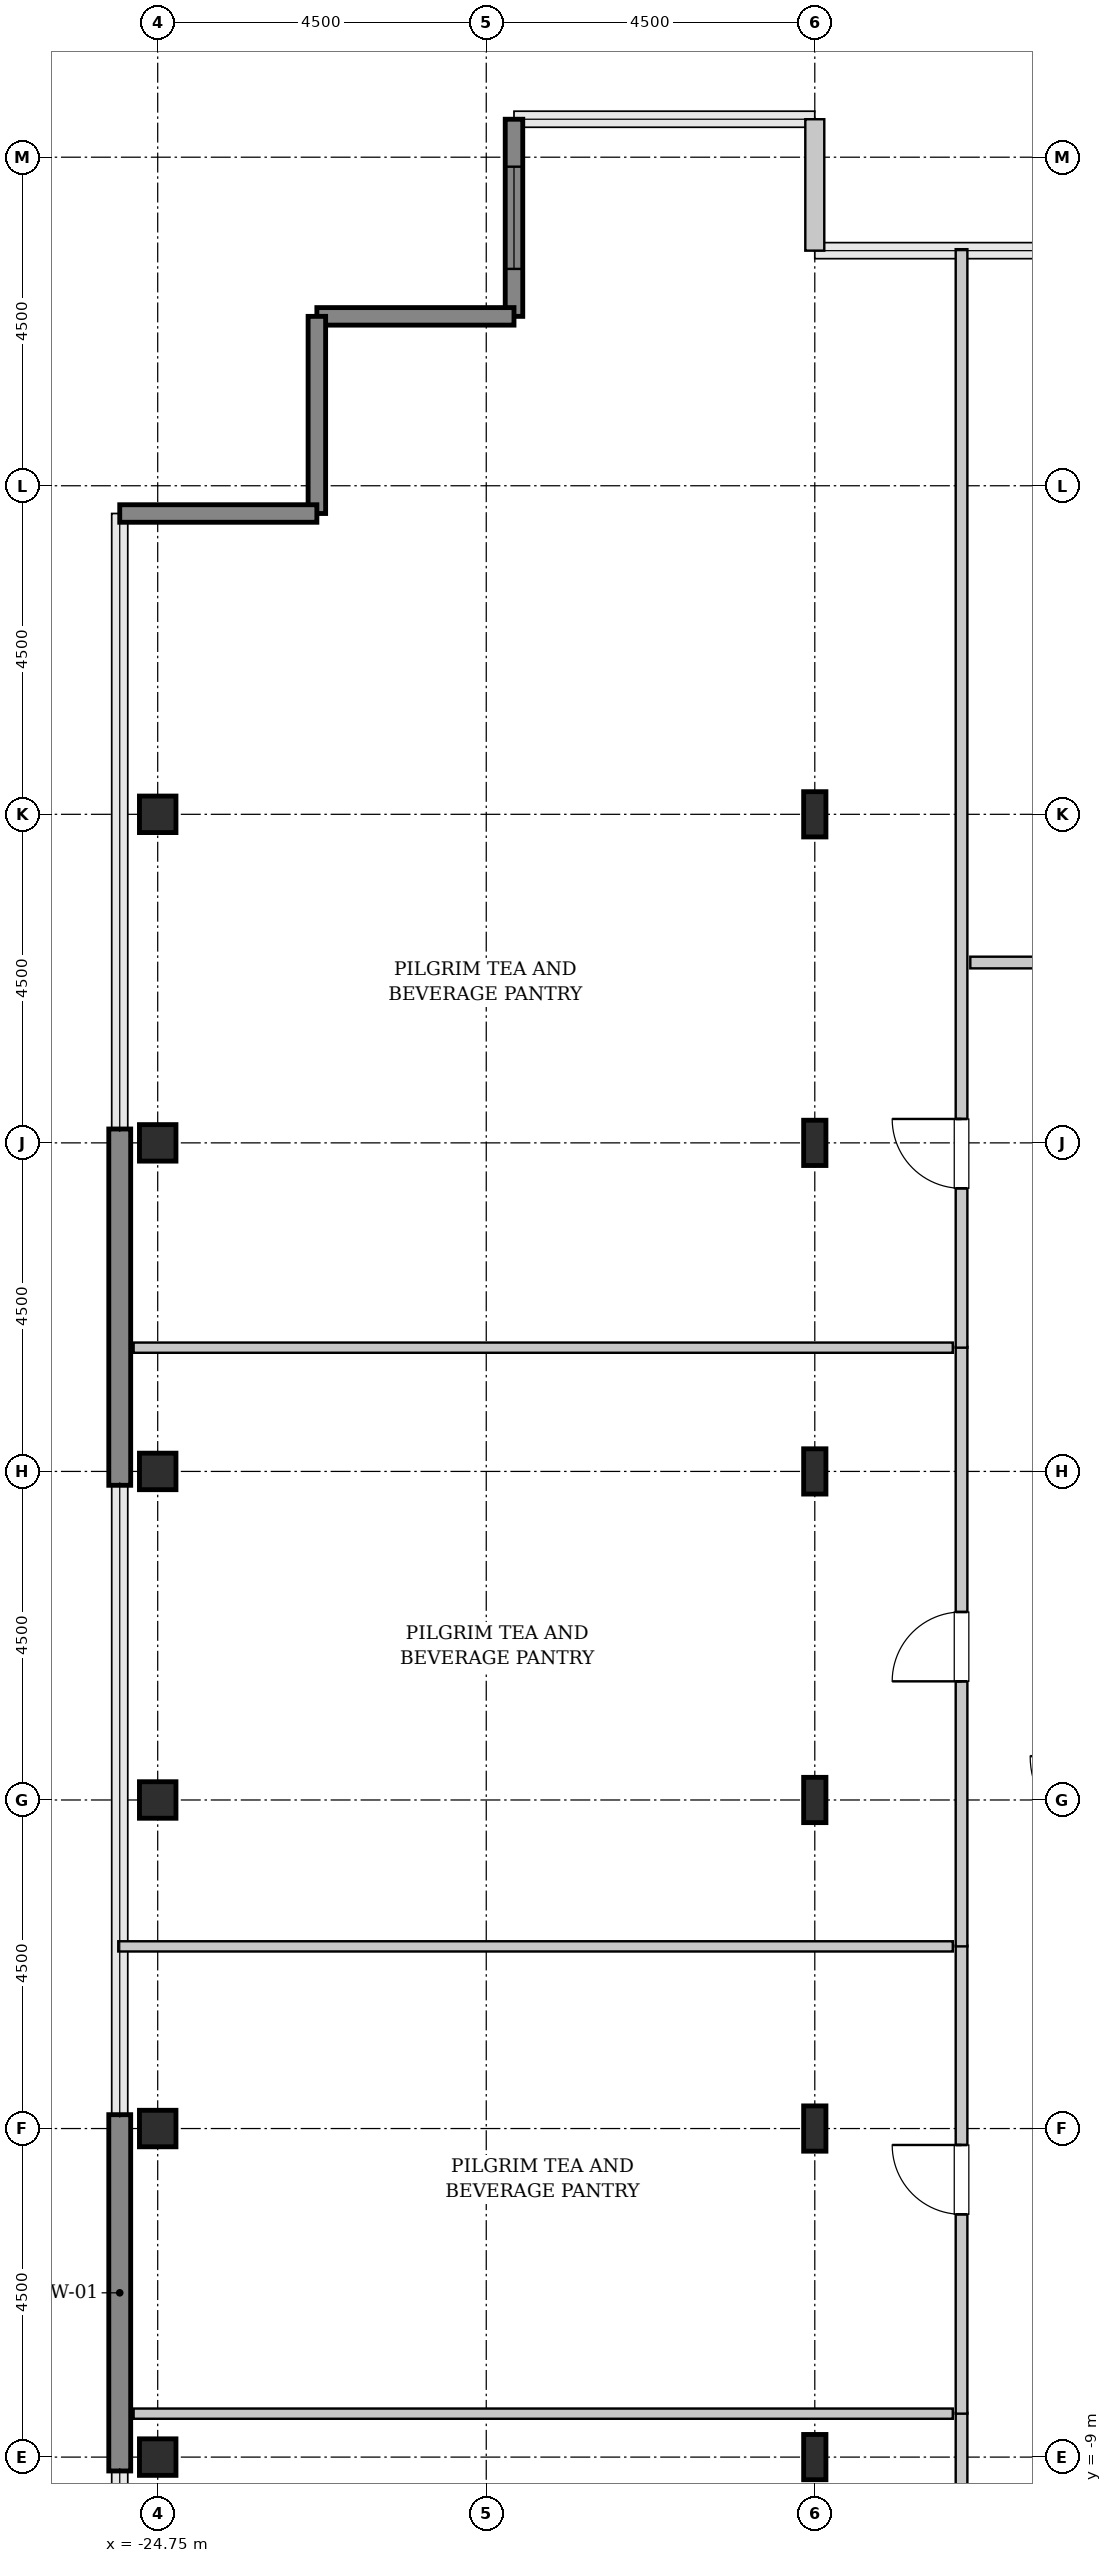
"""IFC4 building model, lengths in metres.
Left out: names, types, materials, properties, quantities, classifications, styles, units other than length and angle.
Written with IfcOpenShell. Run it as: python <this file> out.ifc"""

import sys

from ifc_helpers import new_model, si_unit, direction, frame, frame_2d, origin, origin_2d, place, context, subcontext, project, spatial, rectangle, hollow_rectangle, i_section, extrude, source, transform, mapped, element, fill, save


model = new_model("IFC4")
c1 = context("Model", 3, precision=1e-05, world=origin(), true_north=direction((0.0, 1.0)))
c2 = subcontext(c1, "Body", "Model", "MODEL_VIEW")
j1 = project(units=[si_unit("LENGTHUNIT", "METRE"), si_unit("PLANEANGLEUNIT", "RADIAN")], contexts=[c1])
p1 = place(None, origin())
s1 = spatial("IfcSite", under=j1, at=p1, CompositionType="ELEMENT")
p2 = place(p1, origin())
s2 = spatial("IfcBuilding", under=s1, at=p2, CompositionType="ELEMENT")
p3 = place(p2, frame((0.0, 0.0, 322.4)))
s3 = spatial("IfcBuildingStorey", under=s2, at=p3, CompositionType="ELEMENT", Elevation=322.4)
m1 = source(origin(), c2, "Body", "SweptSolid", [
    extrude(hollow_rectangle(XDim=0.5, YDim=0.5, WallThickness=0.025, InnerFilletRadius=0.025, OuterFilletRadius=0.05, at=origin_2d()), origin(), (0.0, 0.0, 1.0), 3.8),
])
for number, where, z_axis, x_axis in (
    (1, (-24.75, -9.0, 0.0), (0.0, 0.0, 1.0), (1.0, 0.0, 0.0)),
    (2, (-24.75, -4.5, 0.0), (0.0, 0.0, 1.0), (1.0, 0.0, 0.0)),
    (3, (-24.75, 0.0, 0.0), (0.0, 0.0, 1.0), (1.0, 0.0, 0.0)),
    (4, (-24.75, 4.5, 0.0), (0.0, 0.0, 1.0), (1.0, 0.0, 0.0)),
    (5, (-24.75, 9.0, 0.0), (0.0, 0.0, 1.0), (1.0, 0.0, 0.0)),
    (6, (-24.75, 13.5, 0.0), (0.0, 0.0, 1.0), (1.0, 0.0, 0.0)),
):
    element("IfcColumn", number, at=place(p3, frame(where, z_axis=z_axis, x_axis=x_axis)), inside=s3, PredefinedType="COLUMN", context=c2, shape_type="MappedRepresentation", body=[
        mapped(m1, transform((0.0, 0.0, 0.0), x_axis=(1.0, 0.0, 0.0), y_axis=(0.0, 1.0, 0.0), z_axis=(0.0, 0.0, 1.0), scale=1.0)),
    ])
m2 = source(origin(), c2, "Body", "SweptSolid", [
    extrude(i_section(OverallWidth=0.305, OverallDepth=0.62, WebThickness=0.021, FlangeThickness=0.04, FilletRadius=0.027, at=origin_2d()), origin(), (0.0, 0.0, 1.0), 3.8),
])
for number, where, z_axis, x_axis in (
    (7, (-15.75, -9.0, 0.0), (0.0, 0.0, 1.0), (1.0, 0.0, 0.0)),
    (8, (-15.75, -4.5, 0.0), (0.0, 0.0, 1.0), (1.0, 0.0, 0.0)),
    (9, (-15.75, 0.0, 0.0), (0.0, 0.0, 1.0), (1.0, 0.0, 0.0)),
    (10, (-15.75, 4.5, 0.0), (0.0, 0.0, 1.0), (1.0, 0.0, 0.0)),
    (11, (-15.75, 9.0, 0.0), (0.0, 0.0, 1.0), (1.0, 0.0, 0.0)),
    (12, (-15.75, 13.5, 0.0), (0.0, 0.0, 1.0), (1.0, 0.0, 0.0)),
):
    element("IfcColumn", number, at=place(p3, frame(where, z_axis=z_axis, x_axis=x_axis)), inside=s3, PredefinedType="COLUMN", context=c2, shape_type="MappedRepresentation", body=[
        mapped(m2, transform((0.0, 0.0, 0.0), x_axis=(1.0, 0.0, 0.0), y_axis=(0.0, 1.0, 0.0), z_axis=(0.0, 0.0, 1.0), scale=1.0)),
    ])
m3 = source(origin(), c2, "Body", "SweptSolid", [
    extrude(rectangle(XDim=4.88, YDim=0.3, at=frame_2d((2.44, 0.0))), origin(), (0.0, 0.0, 1.0), 3.55),
])
for number, where, z_axis, x_axis in (
    (13, (-25.27, -9.19, 0.0), (0.0, 0.0, 1.0), (0.0, 1.0, 0.0)),
    (14, (-25.27, 4.31, 0.0), (0.0, 0.0, 1.0), (0.0, 1.0, 0.0)),
):
    element("IfcWall", number, at=place(p3, frame(where, z_axis=z_axis, x_axis=x_axis)), inside=s3, PredefinedType="SHEAR", context=c2, shape_type="MappedRepresentation", body=[
        mapped(m3, transform((0.0, 0.0, 0.0), x_axis=(1.0, 0.0, 0.0), y_axis=(0.0, 1.0, 0.0), z_axis=(0.0, 0.0, 1.0), scale=1.0)),
    ])
m4 = source(origin(), c2, "Body", "SweptSolid", [
    extrude(rectangle(XDim=1.8, YDim=0.26, at=frame_2d((0.9, 0.0))), origin(), (0.0, 0.0, 1.0), 3.55),
])
p4 = place(p3, frame((-15.75, 21.22, 0.0), z_axis=(0.0, 0.0, 1.0), x_axis=(0.0, 1.0, 0.0)))
e15 = element("IfcWall", 15, at=p4, inside=s3, PredefinedType="SOLIDWALL", context=c2, shape_type="MappedRepresentation", body=[
    mapped(m4, transform((0.0, 0.0, 0.0), x_axis=(1.0, 0.0, 0.0), y_axis=(0.0, 1.0, 0.0), z_axis=(0.0, 0.0, 1.0), scale=1.0)),
])
m5 = source(origin(), c2, "Body", "SweptSolid", [
    extrude(rectangle(XDim=2.7, YDim=0.24, at=frame_2d((1.35, 0.0))), origin(), (0.0, 0.0, 1.0), 3.55),
])
p5 = place(p3, frame((-19.87, 23.02, 0.0), z_axis=(0.0, 0.0, 1.0), x_axis=(0.0, -1.0, 0.0)))
e16 = element("IfcWall", 16, at=p5, inside=s3, PredefinedType="SHEAR", context=c2, shape_type="MappedRepresentation", body=[
    mapped(m5, transform((0.0, 0.0, 0.0), x_axis=(1.0, 0.0, 0.0), y_axis=(0.0, 1.0, 0.0), z_axis=(0.0, 0.0, 1.0), scale=1.0)),
])
p6 = place(p5, frame((0.65, 0.0, 0.85)))
e17 = element("IfcOpeningElement", 17, at=p6, cuts=e16, PredefinedType="OPENING", context=c2, shape_type="SweptSolid", body=[
    extrude(rectangle(XDim=1.4, YDim=1.8, at=frame_2d((0.7, 0.9))), frame((0.0, 0.13, 0.0), z_axis=(0.0, -1.0, 0.0), x_axis=(1.0, 0.0, 0.0)), (0.0, 0.0, 1.0), 0.26),
])
for number, where, z_axis, x_axis in (
    (18, (-19.87, 20.32, 0.0), (0.0, 0.0, 1.0), (-1.0, 0.0, 0.0)),
    (19, (-22.57, 20.32, 0.0), (0.0, 0.0, 1.0), (0.0, -1.0, 0.0)),
    (20, (-22.57, 17.62, 0.0), (0.0, 0.0, 1.0), (-1.0, 0.0, 0.0)),
):
    element("IfcWall", number, at=place(p3, frame(where, z_axis=z_axis, x_axis=x_axis)), inside=s3, PredefinedType="SHEAR", context=c2, shape_type="MappedRepresentation", body=[
        mapped(m5, transform((0.0, 0.0, 0.0), x_axis=(1.0, 0.0, 0.0), y_axis=(0.0, 1.0, 0.0), z_axis=(0.0, 0.0, 1.0), scale=1.0)),
    ])
m6 = source(origin(), c2, "Body", "SweptSolid", [
    extrude(rectangle(XDim=14.645, YDim=0.16, at=frame_2d((7.323, 0.0))), origin(), (0.0, 0.0, 1.0), 3.535),
])
p7 = place(p3, frame((-13.74, -23.04, 0.0), z_axis=(0.0, 0.0, 1.0), x_axis=(0.0, 1.0, 0.0)))
e21 = element("IfcWall", 21, at=p7, inside=s3, PredefinedType="PARTITIONING", context=c2, shape_type="MappedRepresentation", body=[
    mapped(m6, transform((0.0, 0.0, 0.0), x_axis=(1.0, 0.0, 0.0), y_axis=(0.0, 1.0, 0.0), z_axis=(0.0, 0.0, 1.0), scale=1.0)),
])
p8 = place(p7, frame((12.613, 0.0, 0.0)))
e22 = element("IfcOpeningElement", 22, at=p8, cuts=e21, PredefinedType="OPENING", context=c2, shape_type="SweptSolid", body=[
    extrude(rectangle(XDim=0.95, YDim=2.1, at=frame_2d((0.475, 1.05))), frame((0.0, 0.09, 0.0), z_axis=(0.0, -1.0, 0.0), x_axis=(1.0, 0.0, 0.0)), (0.0, 0.0, 1.0), 0.18),
])
m7 = source(origin(), c2, "Body", "SweptSolid", [
    extrude(rectangle(XDim=11.22, YDim=0.14, at=frame_2d((5.61, 0.0))), origin(), (0.0, 0.0, 1.0), 3.535),
])
p9 = place(p3, frame((-25.08, -8.405, 0.0), z_axis=(0.0, 0.0, 1.0), x_axis=(1.0, 0.0, 0.0)))
e23 = element("IfcWall", 23, at=p9, inside=s3, PredefinedType="PARTITIONING", context=c2, shape_type="MappedRepresentation", body=[
    mapped(m7, transform((0.0, 0.0, 0.0), x_axis=(1.0, 0.0, 0.0), y_axis=(0.0, 1.0, 0.0), z_axis=(0.0, 0.0, 1.0), scale=1.0)),
])
m8 = source(origin(), c2, "Body", "SweptSolid", [
    extrude(rectangle(XDim=6.41, YDim=0.16, at=frame_2d((3.205, 0.0))), origin(), (0.0, 0.0, 1.0), 3.535),
])
p10 = place(p3, frame((-13.74, -8.405, 0.0), z_axis=(0.0, 0.0, 1.0), x_axis=(0.0, 1.0, 0.0)))
e24 = element("IfcWall", 24, at=p10, inside=s3, PredefinedType="PARTITIONING", context=c2, shape_type="MappedRepresentation", body=[
    mapped(m8, transform((0.0, 0.0, 0.0), x_axis=(1.0, 0.0, 0.0), y_axis=(0.0, 1.0, 0.0), z_axis=(0.0, 0.0, 1.0), scale=1.0)),
])
p11 = place(p10, frame((2.73, 0.0, 0.0)))
e25 = element("IfcOpeningElement", 25, at=p11, cuts=e24, PredefinedType="OPENING", context=c2, shape_type="SweptSolid", body=[
    extrude(rectangle(XDim=0.95, YDim=2.1, at=frame_2d((0.475, 1.05))), frame((0.0, 0.09, 0.0), z_axis=(0.0, -1.0, 0.0), x_axis=(1.0, 0.0, 0.0)), (0.0, 0.0, 1.0), 0.18),
])
m9 = source(origin(), c2, "Body", "SweptSolid", [
    extrude(rectangle(XDim=11.43, YDim=0.14, at=frame_2d((5.715, 0.0))), origin(), (0.0, 0.0, 1.0), 3.535),
])
p12 = place(p3, frame((-25.29, -2.005, 0.0), z_axis=(0.0, 0.0, 1.0), x_axis=(1.0, 0.0, 0.0)))
e26 = element("IfcWall", 26, at=p12, inside=s3, PredefinedType="PARTITIONING", context=c2, shape_type="MappedRepresentation", body=[
    mapped(m9, transform((0.0, 0.0, 0.0), x_axis=(1.0, 0.0, 0.0), y_axis=(0.0, 1.0, 0.0), z_axis=(0.0, 0.0, 1.0), scale=1.0)),
])
m10 = source(origin(), c2, "Body", "SweptSolid", [
    extrude(rectangle(XDim=8.21, YDim=0.16, at=frame_2d((4.105, 0.0))), origin(), (0.0, 0.0, 1.0), 3.535),
])
p13 = place(p3, frame((-13.74, -2.005, 0.0), z_axis=(0.0, 0.0, 1.0), x_axis=(0.0, 1.0, 0.0)))
e27 = element("IfcWall", 27, at=p13, inside=s3, PredefinedType="PARTITIONING", context=c2, shape_type="MappedRepresentation", body=[
    mapped(m10, transform((0.0, 0.0, 0.0), x_axis=(1.0, 0.0, 0.0), y_axis=(0.0, 1.0, 0.0), z_axis=(0.0, 0.0, 1.0), scale=1.0)),
])
p14 = place(p13, frame((3.63, 0.0, 0.0)))
e28 = element("IfcOpeningElement", 28, at=p14, cuts=e27, PredefinedType="OPENING", context=c2, shape_type="SweptSolid", body=[
    extrude(rectangle(XDim=0.95, YDim=2.1, at=frame_2d((0.475, 1.05))), frame((0.0, 0.09, 0.0), z_axis=(0.0, -1.0, 0.0), x_axis=(1.0, 0.0, 0.0)), (0.0, 0.0, 1.0), 0.18),
])
p15 = place(p3, frame((-25.08, 6.195, 0.0), z_axis=(0.0, 0.0, 1.0), x_axis=(1.0, 0.0, 0.0)))
e29 = element("IfcWall", 29, at=p15, inside=s3, PredefinedType="PARTITIONING", context=c2, shape_type="MappedRepresentation", body=[
    mapped(m7, transform((0.0, 0.0, 0.0), x_axis=(1.0, 0.0, 0.0), y_axis=(0.0, 1.0, 0.0), z_axis=(0.0, 0.0, 1.0), scale=1.0)),
])
m11 = source(origin(), c2, "Body", "SweptSolid", [
    extrude(rectangle(XDim=15.045, YDim=0.16, at=frame_2d((7.522, 0.0))), origin(), (0.0, 0.0, 1.0), 3.535),
])
p16 = place(p3, frame((-13.74, 6.195, 0.0), z_axis=(0.0, 0.0, 1.0), x_axis=(0.0, 1.0, 0.0)))
e30 = element("IfcWall", 30, at=p16, inside=s3, PredefinedType="PARTITIONING", context=c2, shape_type="MappedRepresentation", body=[
    mapped(m11, transform((0.0, 0.0, 0.0), x_axis=(1.0, 0.0, 0.0), y_axis=(0.0, 1.0, 0.0), z_axis=(0.0, 0.0, 1.0), scale=1.0)),
])
p17 = place(p16, frame((2.183, 0.0, 0.0)))
e31 = element("IfcOpeningElement", 31, at=p17, cuts=e30, PredefinedType="OPENING", context=c2, shape_type="SweptSolid", body=[
    extrude(rectangle(XDim=0.95, YDim=2.1, at=frame_2d((0.475, 1.05))), frame((0.0, 0.09, 0.0), z_axis=(0.0, -1.0, 0.0), x_axis=(1.0, 0.0, 0.0)), (0.0, 0.0, 1.0), 0.18),
])
m12 = source(origin(), c2, "Body", "SweptSolid", [
    extrude(rectangle(XDim=4.125, YDim=0.16, at=frame_2d((2.062, 0.0))), origin(), (0.0, 0.0, 1.0), 3.535),
])
p18 = place(p3, frame((-13.62, 11.47, 0.0), z_axis=(0.0, 0.0, 1.0), x_axis=(1.0, 0.0, 0.0)))
e32 = element("IfcWall", 32, at=p18, inside=s3, PredefinedType="PARTITIONING", context=c2, shape_type="MappedRepresentation", body=[
    mapped(m12, transform((0.0, 0.0, 0.0), x_axis=(1.0, 0.0, 0.0), y_axis=(0.0, 1.0, 0.0), z_axis=(0.0, 0.0, 1.0), scale=1.0)),
])
p19 = place(p18, frame((1.587, 0.0, 0.0)))
e33 = element("IfcOpeningElement", 33, at=p19, cuts=e32, PredefinedType="OPENING", context=c2, shape_type="SweptSolid", body=[
    extrude(rectangle(XDim=0.95, YDim=2.1, at=frame_2d((0.475, 1.05))), frame((0.0, 0.09, 0.0), z_axis=(0.0, -1.0, 0.0), x_axis=(1.0, 0.0, 0.0)), (0.0, 0.0, 1.0), 0.18),
])
m13 = source(origin(), c2, "Body", "SweptSolid", [
    extrude(rectangle(XDim=1.4, YDim=1.8, at=frame_2d((0.7, 0.9))), frame((0.0, 0.03, 0.0), z_axis=(0.0, -1.0, 0.0), x_axis=(1.0, 0.0, 0.0)), (0.0, 0.0, 1.0), 0.06),
])
p20 = place(p6, origin())
e34 = element("IfcWindow", 34, at=p20, inside=s3, PartitioningType="SINGLE_PANEL", PredefinedType="WINDOW", context=c2, shape_type="MappedRepresentation", body=[
    mapped(m13, transform((0.0, 0.0, 0.0), x_axis=(1.0, 0.0, 0.0), y_axis=(0.0, 1.0, 0.0), z_axis=(0.0, 0.0, 1.0), scale=1.0)),
])
fill(e17, e34)
m14 = source(origin(), c2, "Body", "SweptSolid", [
    extrude(rectangle(XDim=0.95, YDim=2.1, at=frame_2d((0.475, 1.05))), frame((0.0, 0.025, 0.0), z_axis=(0.0, -1.0, 0.0), x_axis=(1.0, 0.0, 0.0)), (0.0, 0.0, 1.0), 0.05),
])
p21 = place(p11, origin())
e35 = element("IfcDoor", 35, at=p21, inside=s3, OperationType="SINGLE_SWING_RIGHT", PredefinedType="DOOR", context=c2, shape_type="MappedRepresentation", body=[
    mapped(m14, transform((0.0, 0.0, 0.0), x_axis=(1.0, 0.0, 0.0), y_axis=(0.0, 1.0, 0.0), z_axis=(0.0, 0.0, 1.0), scale=1.0)),
])
fill(e25, e35)
p22 = place(p14, origin())
e36 = element("IfcDoor", 36, at=p22, inside=s3, OperationType="SINGLE_SWING_LEFT", PredefinedType="DOOR", context=c2, shape_type="MappedRepresentation", body=[
    mapped(m14, transform((0.0, 0.0, 0.0), x_axis=(1.0, 0.0, 0.0), y_axis=(0.0, 1.0, 0.0), z_axis=(0.0, 0.0, 1.0), scale=1.0)),
])
fill(e28, e36)
p23 = place(p17, origin())
e37 = element("IfcDoor", 37, at=p23, inside=s3, OperationType="SINGLE_SWING_RIGHT", PredefinedType="DOOR", context=c2, shape_type="MappedRepresentation", body=[
    mapped(m14, transform((0.0, 0.0, 0.0), x_axis=(1.0, 0.0, 0.0), y_axis=(0.0, 1.0, 0.0), z_axis=(0.0, 0.0, 1.0), scale=1.0)),
])
fill(e31, e37)
save(model, sys.argv[1])
